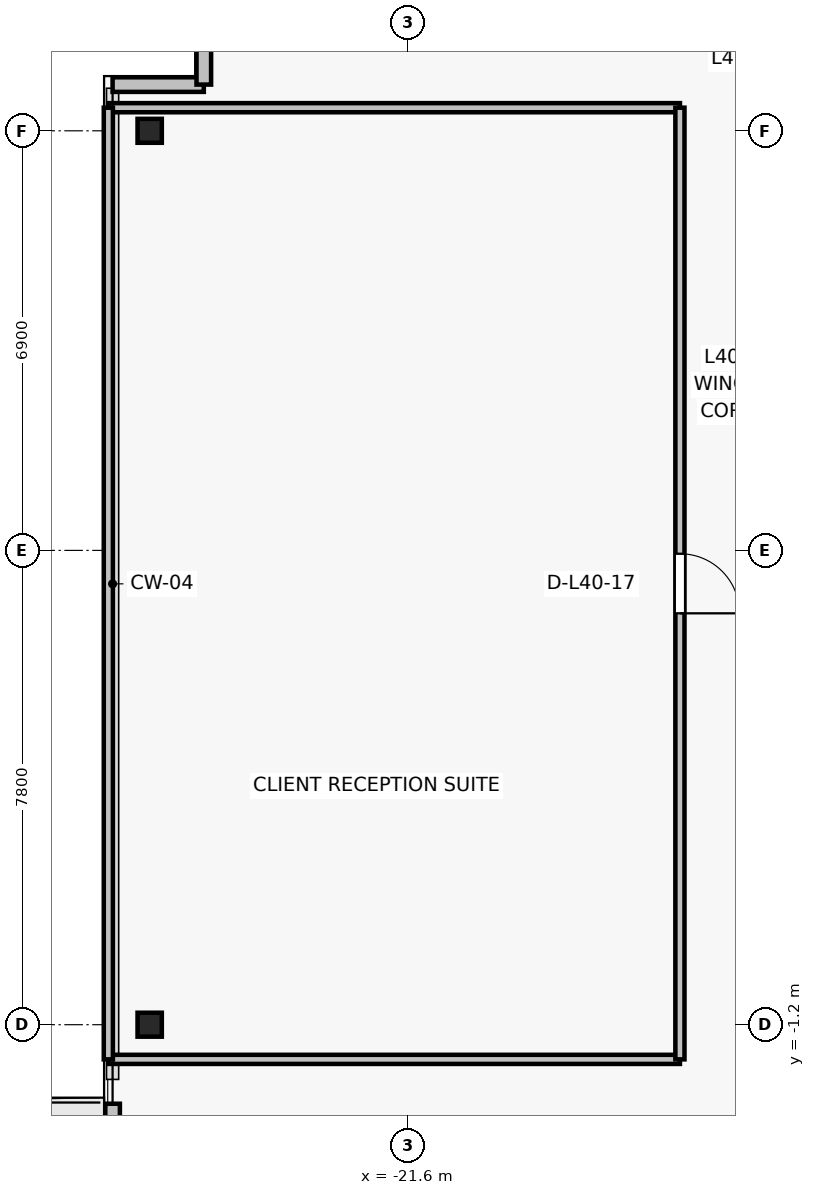
"""IFC4 building model, lengths in metres.
Left out: names, types, materials, properties, quantities, classifications, styles, units other than length and angle.
Written with IfcOpenShell. Run it as: python <this file> out.ifc"""

import sys

from ifc_helpers import new_model, si_unit, direction, frame, frame_2d, origin, origin_2d, place, context, subcontext, project, spatial, rectangle, i_section, extrude, source, transform, mapped, element, fill, save


model = new_model("IFC4")
c1 = context("Model", 3, precision=1e-05, world=origin(), true_north=direction((0.0, 1.0)))
c2 = subcontext(c1, "Body", "Model", "MODEL_VIEW")
j1 = project(units=[si_unit("LENGTHUNIT", "METRE"), si_unit("PLANEANGLEUNIT", "RADIAN")], contexts=[c1])
p1 = place(None, origin())
s1 = spatial("IfcSite", under=j1, at=p1, CompositionType="ELEMENT")
p2 = place(p1, origin())
s2 = spatial("IfcBuilding", under=s1, at=p2, CompositionType="ELEMENT")
p3 = place(p2, frame((0.0, 0.0, 146.2)))
s3 = spatial("IfcBuildingStorey", under=s2, at=p3, CompositionType="ELEMENT", Elevation=146.2)
for number, where, z_axis, x_axis in (
    (1, (-25.85, -1.2, 0.0), (0.0, 0.0, 1.0), (1.0, 0.0, 0.0)),
    (2, (-25.85, 13.5, 0.0), (0.0, 0.0, 1.0), (1.0, 0.0, 0.0)),
):
    element("IfcColumn", number, at=place(p3, frame(where, z_axis=z_axis, x_axis=x_axis)), inside=s3, PredefinedType="COLUMN", context=c2, shape_type="SweptSolid", body=[
        extrude(i_section(OverallWidth=0.399, OverallDepth=0.394, WebThickness=0.023, FlangeThickness=0.037, FilletRadius=0.015, at=origin_2d()), origin(), (0.0, 0.0, 1.0), 3.3),
    ])
p4 = place(p3, frame((-26.46, -8.3, 0.0), z_axis=(0.0, 0.0, 1.0), x_axis=(0.0, 1.0, 0.0)))
e3 = element("IfcWall", 3, at=p4, inside=s3, PredefinedType="SOLIDWALL", context=c2, shape_type="SweptSolid", body=[
    extrude(rectangle(XDim=5.8, YDim=0.24, at=frame_2d((2.9, 0.0))), origin(), (0.0, 0.0, 1.0), 3.075),
])
p5 = place(p4, frame((0.696, 0.0, 0.0)))
e4 = element("IfcOpeningElement", 4, at=p5, cuts=e3, PredefinedType="OPENING", context=c2, shape_type="SweptSolid", body=[
    extrude(rectangle(XDim=1.0, YDim=2.2, at=frame_2d((0.5, 1.1))), frame((0.0, 0.13, 0.0), z_axis=(0.0, -1.0, 0.0), x_axis=(1.0, 0.0, 0.0)), (0.0, 0.0, 1.0), 0.26),
])
p6 = place(p4, frame((2.046, 0.0, 0.85)))
e5 = element("IfcOpeningElement", 5, at=p6, cuts=e3, PredefinedType="OPENING", context=c2, shape_type="SweptSolid", body=[
    extrude(rectangle(XDim=1.5, YDim=1.6, at=frame_2d((0.75, 0.8))), frame((0.0, 0.13, 0.0), z_axis=(0.0, -1.0, 0.0), x_axis=(1.0, 0.0, 0.0)), (0.0, 0.0, 1.0), 0.26),
])
for number, where, z_axis, x_axis in (
    (6, (-24.96, 14.26, 0.0), (0.0, 0.0, 1.0), (-1.0, 0.0, 0.0)),
    (7, (-24.96, 15.76, 0.0), (0.0, 0.0, 1.0), (0.0, -1.0, 0.0)),
):
    element("IfcWall", number, at=place(p3, frame(where, z_axis=z_axis, x_axis=x_axis)), inside=s3, PredefinedType="SOLIDWALL", context=c2, shape_type="SweptSolid", body=[
        extrude(rectangle(XDim=1.5, YDim=0.24, at=frame_2d((0.75, 0.0))), origin(), (0.0, 0.0, 1.0), 3.075),
    ])
p7 = place(p3, frame((-17.13, -1.77, 0.0), z_axis=(0.0, 0.0, 1.0), x_axis=(-1.0, 0.0, 0.0)))
e8 = element("IfcWall", 8, at=p7, inside=s3, PredefinedType="PARTITIONING", context=c2, shape_type="SweptSolid", body=[
    extrude(rectangle(XDim=9.4, YDim=0.15, at=frame_2d((4.7, 0.0))), origin(), (0.0, 0.0, 1.0), 2.565),
])
p8 = place(p3, frame((-26.53, 13.88, 0.0), z_axis=(0.0, 0.0, 1.0), x_axis=(1.0, 0.0, 0.0)))
e9 = element("IfcWall", 9, at=p8, inside=s3, PredefinedType="PARTITIONING", context=c2, shape_type="SweptSolid", body=[
    extrude(rectangle(XDim=9.4, YDim=0.15, at=frame_2d((4.7, 0.0))), origin(), (0.0, 0.0, 1.0), 3.075),
])
p9 = place(p3, frame((-26.53, -1.77, 0.0), z_axis=(0.0, 0.0, 1.0), x_axis=(0.0, 1.0, 0.0)))
e10 = element("IfcWall", 10, at=p9, inside=s3, PredefinedType="PARTITIONING", context=c2, shape_type="SweptSolid", body=[
    extrude(rectangle(XDim=15.65, YDim=0.15, at=frame_2d((7.825, 0.0))), origin(), (0.0, 0.0, 1.0), 3.075),
])
p10 = place(p3, frame((-17.13, 13.88, 0.0), z_axis=(0.0, 0.0, 1.0), x_axis=(0.0, -1.0, 0.0)))
e11 = element("IfcWall", 11, at=p10, inside=s3, PredefinedType="PARTITIONING", context=c2, shape_type="SweptSolid", body=[
    extrude(rectangle(XDim=15.65, YDim=0.15, at=frame_2d((7.825, 0.0))), origin(), (0.0, 0.0, 1.0), 2.565),
])
p11 = place(p10, frame((7.335, 0.0, 0.0)))
e12 = element("IfcOpeningElement", 12, at=p11, cuts=e11, PredefinedType="OPENING", context=c2, shape_type="SweptSolid", body=[
    extrude(rectangle(XDim=0.98, YDim=2.15, at=frame_2d((0.49, 1.075))), frame((0.0, 0.085, 0.0), z_axis=(0.0, -1.0, 0.0), x_axis=(1.0, 0.0, 0.0)), (0.0, 0.0, 1.0), 0.17),
])
m1 = source(origin(), c2, "Body", "SweptSolid", [
    extrude(rectangle(XDim=0.98, YDim=2.15, at=frame_2d((0.49, 1.075))), frame((0.0, 0.025, 0.0), z_axis=(0.0, -1.0, 0.0), x_axis=(1.0, 0.0, 0.0)), (0.0, 0.0, 1.0), 0.05),
])
p12 = place(p11, origin())
e13 = element("IfcDoor", 13, at=p12, inside=s3, OperationType="SINGLE_SWING_RIGHT", PredefinedType="DOOR", context=c2, shape_type="MappedRepresentation", body=[
    mapped(m1, transform((0.0, 0.0, 0.0), x_axis=(1.0, 0.0, 0.0), y_axis=(0.0, 1.0, 0.0), z_axis=(0.0, 0.0, 1.0), scale=1.0)),
])
fill(e12, e13)
save(model, sys.argv[1])
